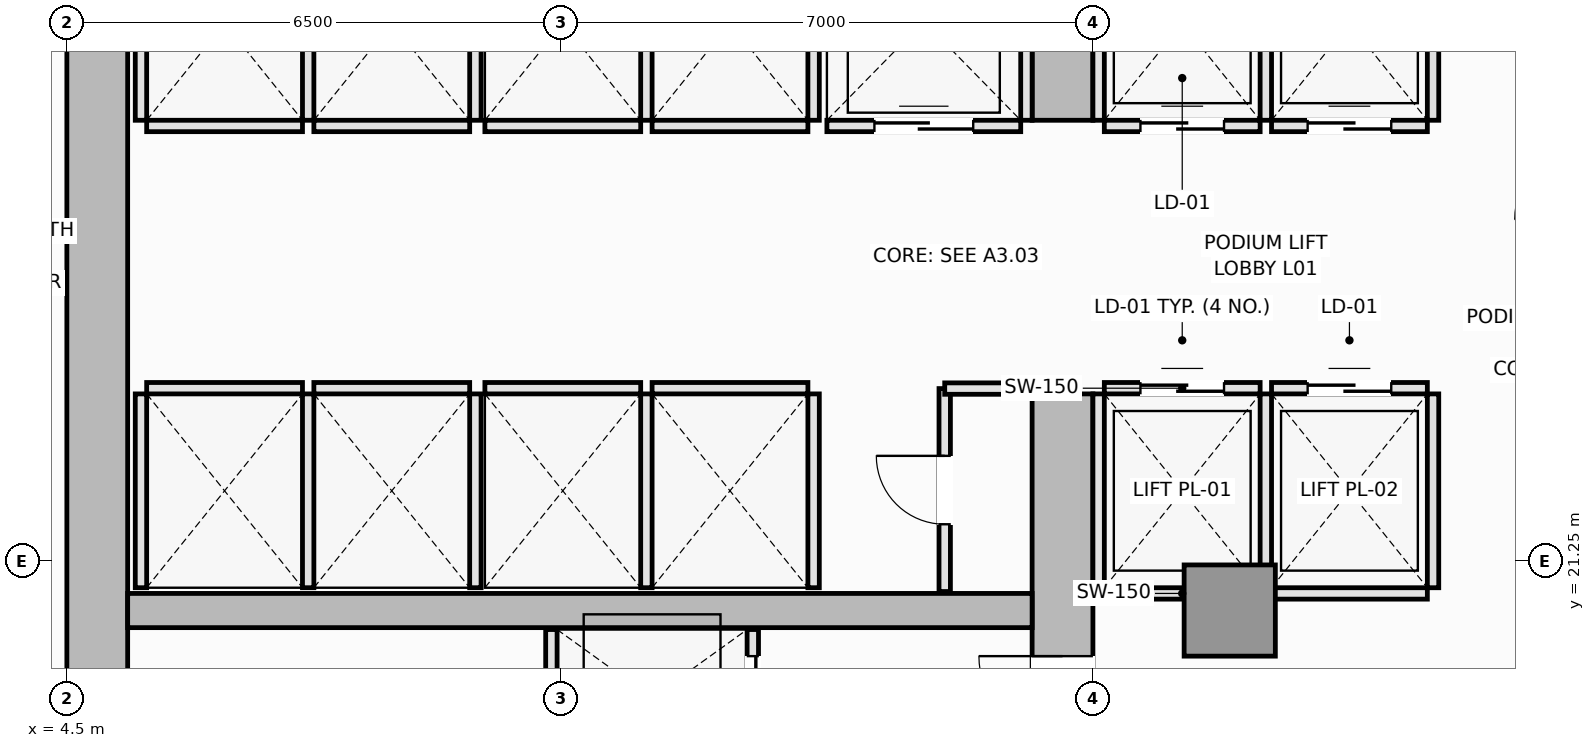
"""IFC4 building model, lengths in metres.
Left out: names, types, materials, properties, quantities, classifications, styles, units other than length and angle.
Written with IfcOpenShell. Run it as: python <this file> out.ifc"""

import sys

from ifc_helpers import new_model, si_unit, direction, frame, frame_2d, origin, origin_2d, place, context, subcontext, project, spatial, rectangle, extrude, element, fill, save


model = new_model("IFC4")
c1 = context("Model", 3, precision=1e-05, world=origin(), true_north=direction((0.0, 1.0)))
c2 = subcontext(c1, "Body", "Model", "MODEL_VIEW")
j1 = project(units=[si_unit("LENGTHUNIT", "METRE"), si_unit("PLANEANGLEUNIT", "RADIAN")], contexts=[c1])
p1 = place(None, origin())
s1 = spatial("IfcSite", under=j1, at=p1, CompositionType="ELEMENT")
p2 = place(p1, origin())
s2 = spatial("IfcBuilding", under=s1, at=p2, CompositionType="ELEMENT")
p3 = place(p2, frame((0.0, 0.0, 6.0)))
s3 = spatial("IfcBuildingStorey", under=s2, at=p3, CompositionType="ELEMENT", Elevation=6.0)
p4 = place(p3, frame((4.9, 14.8, 0.0), z_axis=(0.0, 0.0, 1.0), x_axis=(0.0, 1.0, 0.0)))
e1 = element("IfcWall", 1, at=p4, inside=s3, PredefinedType="SHEAR", context=c2, shape_type="SweptSolid", body=[
    extrude(rectangle(XDim=20.9, YDim=0.8, at=frame_2d((10.45, 0.0))), origin(), (0.0, 0.0, 1.0), 4.8),
])
p5 = place(p3, frame((17.6, 14.8, 0.0), z_axis=(0.0, 0.0, 1.0), x_axis=(0.0, 1.0, 0.0)))
e2 = element("IfcWall", 2, at=p5, inside=s3, PredefinedType="SHEAR", context=c2, shape_type="SweptSolid", body=[
    extrude(rectangle(XDim=8.65, YDim=0.8, at=frame_2d((4.325, 0.0))), origin(), (0.0, 0.0, 1.0), 4.8),
])
p6 = place(p5, frame((4.1, 0.0, 0.0)))
e3 = element("IfcOpeningElement", 3, at=p6, cuts=e2, PredefinedType="OPENING", context=c2, shape_type="SweptSolid", body=[
    extrude(rectangle(XDim=1.1, YDim=2.15, at=frame_2d((0.55, 1.075))), frame((0.0, 0.41, 0.0), z_axis=(0.0, -1.0, 0.0), x_axis=(1.0, 0.0, 0.0)), (0.0, 0.0, 1.0), 0.82),
])
p7 = place(p3, frame((17.6, 27.05, 0.0), z_axis=(0.0, 0.0, 1.0), x_axis=(0.0, 1.0, 0.0)))
e4 = element("IfcWall", 4, at=p7, inside=s3, PredefinedType="SHEAR", context=c2, shape_type="SweptSolid", body=[
    extrude(rectangle(XDim=8.65, YDim=0.8, at=frame_2d((4.325, 0.0))), origin(), (0.0, 0.0, 1.0), 4.8),
])
p8 = place(p7, frame((3.45, 0.0, 0.0)))
e5 = element("IfcOpeningElement", 5, at=p8, cuts=e4, PredefinedType="OPENING", context=c2, shape_type="SweptSolid", body=[
    extrude(rectangle(XDim=1.1, YDim=2.15, at=frame_2d((0.55, 1.075))), frame((0.0, 0.41, 0.0), z_axis=(0.0, -1.0, 0.0), x_axis=(1.0, 0.0, 0.0)), (0.0, 0.0, 1.0), 0.82),
])
p9 = place(p3, frame((5.3, 20.6, 0.0), z_axis=(0.0, 0.0, 1.0), x_axis=(1.0, 0.0, 0.0)))
e6 = element("IfcWall", 6, at=p9, inside=s3, PredefinedType="SHEAR", context=c2, shape_type="SweptSolid", body=[
    extrude(rectangle(XDim=11.9, YDim=0.45, at=frame_2d((5.95, 0.0))), origin(), (0.0, 0.0, 1.0), 4.8),
])
p10 = place(p3, frame((19.8, 20.6, 0.0), z_axis=(0.0, 0.0, 1.0), x_axis=(1.0, 0.0, 0.0)))
e7 = element("IfcColumn", 7, at=p10, inside=s3, PredefinedType="COLUMN", context=c2, shape_type="SweptSolid", body=[
    extrude(rectangle(XDim=1.2, YDim=1.2, at=origin_2d()), origin(), (0.0, 0.0, 1.0), 4.8),
])
p11 = place(p3, frame((18.15, 20.825, 0.0), z_axis=(0.0, 0.0, 1.0), x_axis=(1.0, 0.0, 0.0)))
e8 = element("IfcWall", 8, at=p11, inside=s3, PredefinedType="PARTITIONING", context=c2, shape_type="SweptSolid", body=[
    extrude(rectangle(XDim=2.05, YDim=0.15, at=frame_2d((1.025, 0.0))), origin(), (0.0, 0.0, 1.0), 4.6),
])
p12 = place(p3, frame((18.15, 23.525, 0.0), z_axis=(0.0, 0.0, 1.0), x_axis=(1.0, 0.0, 0.0)))
e9 = element("IfcWall", 9, at=p12, inside=s3, PredefinedType="PARTITIONING", context=c2, shape_type="SweptSolid", body=[
    extrude(rectangle(XDim=2.05, YDim=0.15, at=frame_2d((1.025, 0.0))), origin(), (0.0, 0.0, 1.0), 4.6),
])
p13 = place(p12, frame((0.475, 0.0, 0.0)))
e10 = element("IfcOpeningElement", 10, at=p13, cuts=e9, PredefinedType="OPENING", context=c2, shape_type="SweptSolid", body=[
    extrude(rectangle(XDim=1.1, YDim=2.2, at=frame_2d((0.55, 1.1))), frame((0.0, 0.085, 0.0), z_axis=(0.0, -1.0, 0.0), x_axis=(1.0, 0.0, 0.0)), (0.0, 0.0, 1.0), 0.17),
])
for number, where, z_axis, x_axis in (
    (11, (18.075, 20.9, 0.0), (0.0, 0.0, 1.0), (0.0, 1.0, 0.0)),
    (12, (20.275, 20.9, 0.0), (0.0, 0.0, 1.0), (0.0, 1.0, 0.0)),
):
    element("IfcWall", number, at=place(p3, frame(where, z_axis=z_axis, x_axis=x_axis)), inside=s3, PredefinedType="PARTITIONING", context=c2, shape_type="SweptSolid", body=[
        extrude(rectangle(XDim=2.55, YDim=0.15, at=frame_2d((1.275, 0.0))), origin(), (0.0, 0.0, 1.0), 4.6),
    ])
p14 = place(p3, frame((20.35, 20.825, 0.0), z_axis=(0.0, 0.0, 1.0), x_axis=(1.0, 0.0, 0.0)))
e13 = element("IfcWall", 13, at=p14, inside=s3, PredefinedType="PARTITIONING", context=c2, shape_type="SweptSolid", body=[
    extrude(rectangle(XDim=2.05, YDim=0.15, at=frame_2d((1.025, 0.0))), origin(), (0.0, 0.0, 1.0), 4.6),
])
p15 = place(p3, frame((20.35, 23.525, 0.0), z_axis=(0.0, 0.0, 1.0), x_axis=(1.0, 0.0, 0.0)))
e14 = element("IfcWall", 14, at=p15, inside=s3, PredefinedType="PARTITIONING", context=c2, shape_type="SweptSolid", body=[
    extrude(rectangle(XDim=2.05, YDim=0.15, at=frame_2d((1.025, 0.0))), origin(), (0.0, 0.0, 1.0), 4.6),
])
p16 = place(p15, frame((0.475, 0.0, 0.0)))
e15 = element("IfcOpeningElement", 15, at=p16, cuts=e14, PredefinedType="OPENING", context=c2, shape_type="SweptSolid", body=[
    extrude(rectangle(XDim=1.1, YDim=2.2, at=frame_2d((0.55, 1.1))), frame((0.0, 0.085, 0.0), z_axis=(0.0, -1.0, 0.0), x_axis=(1.0, 0.0, 0.0)), (0.0, 0.0, 1.0), 0.17),
])
p17 = place(p3, frame((22.475, 20.9, 0.0), z_axis=(0.0, 0.0, 1.0), x_axis=(0.0, 1.0, 0.0)))
e16 = element("IfcWall", 16, at=p17, inside=s3, PredefinedType="PARTITIONING", context=c2, shape_type="SweptSolid", body=[
    extrude(rectangle(XDim=2.55, YDim=0.15, at=frame_2d((1.275, 0.0))), origin(), (0.0, 0.0, 1.0), 4.6),
])
p18 = place(p3, frame((18.15, 26.975, 0.0), z_axis=(0.0, 0.0, 1.0), x_axis=(1.0, 0.0, 0.0)))
e17 = element("IfcWall", 17, at=p18, inside=s3, PredefinedType="PARTITIONING", context=c2, shape_type="SweptSolid", body=[
    extrude(rectangle(XDim=2.05, YDim=0.15, at=frame_2d((1.025, 0.0))), origin(), (0.0, 0.0, 1.0), 4.6),
])
p19 = place(p18, frame((0.475, 0.0, 0.0)))
e18 = element("IfcOpeningElement", 18, at=p19, cuts=e17, PredefinedType="OPENING", context=c2, shape_type="SweptSolid", body=[
    extrude(rectangle(XDim=1.1, YDim=2.2, at=frame_2d((0.55, 1.1))), frame((0.0, 0.085, 0.0), z_axis=(0.0, -1.0, 0.0), x_axis=(1.0, 0.0, 0.0)), (0.0, 0.0, 1.0), 0.17),
])
for number, where, z_axis, x_axis in (
    (19, (18.075, 27.05, 0.0), (0.0, 0.0, 1.0), (0.0, 1.0, 0.0)),
    (20, (20.275, 27.05, 0.0), (0.0, 0.0, 1.0), (0.0, 1.0, 0.0)),
):
    element("IfcWall", number, at=place(p3, frame(where, z_axis=z_axis, x_axis=x_axis)), inside=s3, PredefinedType="PARTITIONING", context=c2, shape_type="SweptSolid", body=[
        extrude(rectangle(XDim=2.55, YDim=0.15, at=frame_2d((1.275, 0.0))), origin(), (0.0, 0.0, 1.0), 4.6),
    ])
p20 = place(p3, frame((20.35, 26.975, 0.0), z_axis=(0.0, 0.0, 1.0), x_axis=(1.0, 0.0, 0.0)))
e21 = element("IfcWall", 21, at=p20, inside=s3, PredefinedType="PARTITIONING", context=c2, shape_type="SweptSolid", body=[
    extrude(rectangle(XDim=2.05, YDim=0.15, at=frame_2d((1.025, 0.0))), origin(), (0.0, 0.0, 1.0), 4.6),
])
p21 = place(p20, frame((0.475, 0.0, 0.0)))
e22 = element("IfcOpeningElement", 22, at=p21, cuts=e21, PredefinedType="OPENING", context=c2, shape_type="SweptSolid", body=[
    extrude(rectangle(XDim=1.1, YDim=2.2, at=frame_2d((0.55, 1.1))), frame((0.0, 0.085, 0.0), z_axis=(0.0, -1.0, 0.0), x_axis=(1.0, 0.0, 0.0)), (0.0, 0.0, 1.0), 0.17),
])
p22 = place(p3, frame((22.475, 27.05, 0.0), z_axis=(0.0, 0.0, 1.0), x_axis=(0.0, 1.0, 0.0)))
e23 = element("IfcWall", 23, at=p22, inside=s3, PredefinedType="PARTITIONING", context=c2, shape_type="SweptSolid", body=[
    extrude(rectangle(XDim=2.55, YDim=0.15, at=frame_2d((1.275, 0.0))), origin(), (0.0, 0.0, 1.0), 4.6),
])
p23 = place(p3, frame((5.55, 23.525, 0.0), z_axis=(0.0, 0.0, 1.0), x_axis=(1.0, 0.0, 0.0)))
e24 = element("IfcWall", 24, at=p23, inside=s3, PredefinedType="PARTITIONING", context=c2, shape_type="SweptSolid", body=[
    extrude(rectangle(XDim=2.05, YDim=0.15, at=frame_2d((1.025, 0.0))), origin(), (0.0, 0.0, 1.0), 4.6),
])
for number, where, z_axis, x_axis in (
    (25, (5.475, 20.9, 0.0), (0.0, 0.0, 1.0), (0.0, 1.0, 0.0)),
    (26, (7.675, 20.9, 0.0), (0.0, 0.0, 1.0), (0.0, 1.0, 0.0)),
):
    element("IfcWall", number, at=place(p3, frame(where, z_axis=z_axis, x_axis=x_axis)), inside=s3, PredefinedType="PARTITIONING", context=c2, shape_type="SweptSolid", body=[
        extrude(rectangle(XDim=2.55, YDim=0.15, at=frame_2d((1.275, 0.0))), origin(), (0.0, 0.0, 1.0), 4.6),
    ])
p24 = place(p3, frame((7.75, 23.525, 0.0), z_axis=(0.0, 0.0, 1.0), x_axis=(1.0, 0.0, 0.0)))
e27 = element("IfcWall", 27, at=p24, inside=s3, PredefinedType="PARTITIONING", context=c2, shape_type="SweptSolid", body=[
    extrude(rectangle(XDim=2.05, YDim=0.15, at=frame_2d((1.025, 0.0))), origin(), (0.0, 0.0, 1.0), 4.6),
])
p25 = place(p3, frame((9.875, 20.9, 0.0), z_axis=(0.0, 0.0, 1.0), x_axis=(0.0, 1.0, 0.0)))
e28 = element("IfcWall", 28, at=p25, inside=s3, PredefinedType="PARTITIONING", context=c2, shape_type="SweptSolid", body=[
    extrude(rectangle(XDim=2.55, YDim=0.15, at=frame_2d((1.275, 0.0))), origin(), (0.0, 0.0, 1.0), 4.6),
])
p26 = place(p3, frame((5.55, 26.975, 0.0), z_axis=(0.0, 0.0, 1.0), x_axis=(1.0, 0.0, 0.0)))
e29 = element("IfcWall", 29, at=p26, inside=s3, PredefinedType="PARTITIONING", context=c2, shape_type="SweptSolid", body=[
    extrude(rectangle(XDim=2.05, YDim=0.15, at=frame_2d((1.025, 0.0))), origin(), (0.0, 0.0, 1.0), 4.6),
])
for number, where, z_axis, x_axis in (
    (30, (5.475, 27.05, 0.0), (0.0, 0.0, 1.0), (0.0, 1.0, 0.0)),
    (31, (7.675, 27.05, 0.0), (0.0, 0.0, 1.0), (0.0, 1.0, 0.0)),
):
    element("IfcWall", number, at=place(p3, frame(where, z_axis=z_axis, x_axis=x_axis)), inside=s3, PredefinedType="PARTITIONING", context=c2, shape_type="SweptSolid", body=[
        extrude(rectangle(XDim=2.55, YDim=0.15, at=frame_2d((1.275, 0.0))), origin(), (0.0, 0.0, 1.0), 4.6),
    ])
p27 = place(p3, frame((7.75, 26.975, 0.0), z_axis=(0.0, 0.0, 1.0), x_axis=(1.0, 0.0, 0.0)))
e32 = element("IfcWall", 32, at=p27, inside=s3, PredefinedType="PARTITIONING", context=c2, shape_type="SweptSolid", body=[
    extrude(rectangle(XDim=2.05, YDim=0.15, at=frame_2d((1.025, 0.0))), origin(), (0.0, 0.0, 1.0), 4.6),
])
p28 = place(p3, frame((9.875, 27.05, 0.0), z_axis=(0.0, 0.0, 1.0), x_axis=(0.0, 1.0, 0.0)))
e33 = element("IfcWall", 33, at=p28, inside=s3, PredefinedType="PARTITIONING", context=c2, shape_type="SweptSolid", body=[
    extrude(rectangle(XDim=2.55, YDim=0.15, at=frame_2d((1.275, 0.0))), origin(), (0.0, 0.0, 1.0), 4.6),
])
p29 = place(p3, frame((10.0, 23.525, 0.0), z_axis=(0.0, 0.0, 1.0), x_axis=(1.0, 0.0, 0.0)))
e34 = element("IfcWall", 34, at=p29, inside=s3, PredefinedType="PARTITIONING", context=c2, shape_type="SweptSolid", body=[
    extrude(rectangle(XDim=2.05, YDim=0.15, at=frame_2d((1.025, 0.0))), origin(), (0.0, 0.0, 1.0), 4.6),
])
p30 = place(p3, frame((12.125, 20.9, 0.0), z_axis=(0.0, 0.0, 1.0), x_axis=(0.0, 1.0, 0.0)))
e35 = element("IfcWall", 35, at=p30, inside=s3, PredefinedType="PARTITIONING", context=c2, shape_type="SweptSolid", body=[
    extrude(rectangle(XDim=2.55, YDim=0.15, at=frame_2d((1.275, 0.0))), origin(), (0.0, 0.0, 1.0), 4.6),
])
p31 = place(p3, frame((12.2, 23.525, 0.0), z_axis=(0.0, 0.0, 1.0), x_axis=(1.0, 0.0, 0.0)))
e36 = element("IfcWall", 36, at=p31, inside=s3, PredefinedType="PARTITIONING", context=c2, shape_type="SweptSolid", body=[
    extrude(rectangle(XDim=2.05, YDim=0.15, at=frame_2d((1.025, 0.0))), origin(), (0.0, 0.0, 1.0), 4.6),
])
p32 = place(p3, frame((14.325, 20.9, 0.0), z_axis=(0.0, 0.0, 1.0), x_axis=(0.0, 1.0, 0.0)))
e37 = element("IfcWall", 37, at=p32, inside=s3, PredefinedType="PARTITIONING", context=c2, shape_type="SweptSolid", body=[
    extrude(rectangle(XDim=2.55, YDim=0.15, at=frame_2d((1.275, 0.0))), origin(), (0.0, 0.0, 1.0), 4.6),
])
p33 = place(p3, frame((10.0, 26.975, 0.0), z_axis=(0.0, 0.0, 1.0), x_axis=(1.0, 0.0, 0.0)))
e38 = element("IfcWall", 38, at=p33, inside=s3, PredefinedType="PARTITIONING", context=c2, shape_type="SweptSolid", body=[
    extrude(rectangle(XDim=2.05, YDim=0.15, at=frame_2d((1.025, 0.0))), origin(), (0.0, 0.0, 1.0), 4.6),
])
p34 = place(p3, frame((12.125, 27.05, 0.0), z_axis=(0.0, 0.0, 1.0), x_axis=(0.0, 1.0, 0.0)))
e39 = element("IfcWall", 39, at=p34, inside=s3, PredefinedType="PARTITIONING", context=c2, shape_type="SweptSolid", body=[
    extrude(rectangle(XDim=2.55, YDim=0.15, at=frame_2d((1.275, 0.0))), origin(), (0.0, 0.0, 1.0), 4.6),
])
p35 = place(p3, frame((12.2, 26.975, 0.0), z_axis=(0.0, 0.0, 1.0), x_axis=(1.0, 0.0, 0.0)))
e40 = element("IfcWall", 40, at=p35, inside=s3, PredefinedType="PARTITIONING", context=c2, shape_type="SweptSolid", body=[
    extrude(rectangle(XDim=2.05, YDim=0.15, at=frame_2d((1.025, 0.0))), origin(), (0.0, 0.0, 1.0), 4.6),
])
p36 = place(p3, frame((14.325, 27.05, 0.0), z_axis=(0.0, 0.0, 1.0), x_axis=(0.0, 1.0, 0.0)))
e41 = element("IfcWall", 41, at=p36, inside=s3, PredefinedType="PARTITIONING", context=c2, shape_type="SweptSolid", body=[
    extrude(rectangle(XDim=2.55, YDim=0.15, at=frame_2d((1.275, 0.0))), origin(), (0.0, 0.0, 1.0), 4.6),
])
p37 = place(p3, frame((14.5, 26.975, 0.0), z_axis=(0.0, 0.0, 1.0), x_axis=(1.0, 0.0, 0.0)))
e42 = element("IfcWall", 42, at=p37, inside=s3, PredefinedType="PARTITIONING", context=c2, shape_type="SweptSolid", body=[
    extrude(rectangle(XDim=2.55, YDim=0.15, at=frame_2d((1.275, 0.0))), origin(), (0.0, 0.0, 1.0), 4.6),
])
p38 = place(p37, frame((0.625, 0.0, 0.0)))
e43 = element("IfcOpeningElement", 43, at=p38, cuts=e42, PredefinedType="OPENING", context=c2, shape_type="SweptSolid", body=[
    extrude(rectangle(XDim=1.3, YDim=2.2, at=frame_2d((0.65, 1.1))), frame((0.0, 0.085, 0.0), z_axis=(0.0, -1.0, 0.0), x_axis=(1.0, 0.0, 0.0)), (0.0, 0.0, 1.0), 0.17),
])
p39 = place(p3, frame((17.125, 27.05, 0.0), z_axis=(0.0, 0.0, 1.0), x_axis=(0.0, 1.0, 0.0)))
e44 = element("IfcWall", 44, at=p39, inside=s3, PredefinedType="PARTITIONING", context=c2, shape_type="SweptSolid", body=[
    extrude(rectangle(XDim=2.6, YDim=0.15, at=frame_2d((1.3, 0.0))), origin(), (0.0, 0.0, 1.0), 4.6),
])
p40 = place(p3, frame((10.875, 18.55, 0.0), z_axis=(0.0, 0.0, 1.0), x_axis=(0.0, 1.0, 0.0)))
e45 = element("IfcWall", 45, at=p40, inside=s3, PredefinedType="PARTITIONING", context=c2, shape_type="SweptSolid", body=[
    extrude(rectangle(XDim=1.8, YDim=0.15, at=frame_2d((0.9, 0.0))), origin(), (0.0, 0.0, 1.0), 4.6),
])
p41 = place(p3, frame((13.525, 18.55, 0.0), z_axis=(0.0, 0.0, 1.0), x_axis=(0.0, 1.0, 0.0)))
e46 = element("IfcWall", 46, at=p41, inside=s3, PredefinedType="PARTITIONING", context=c2, shape_type="SweptSolid", body=[
    extrude(rectangle(XDim=1.8, YDim=0.15, at=frame_2d((0.9, 0.0))), origin(), (0.0, 0.0, 1.0), 4.6),
])
p42 = place(p41, frame((0.35, 0.0, 0.0)))
e47 = element("IfcOpeningElement", 47, at=p42, cuts=e46, PredefinedType="OPENING", context=c2, shape_type="SweptSolid", body=[
    extrude(rectangle(XDim=1.1, YDim=2.2, at=frame_2d((0.55, 1.1))), frame((0.0, 0.085, 0.0), z_axis=(0.0, -1.0, 0.0), x_axis=(1.0, 0.0, 0.0)), (0.0, 0.0, 1.0), 0.17),
])
p43 = place(p3, frame((16.05, 20.85, 0.0), z_axis=(0.0, 0.0, 1.0), x_axis=(0.0, 1.0, 0.0)))
e48 = element("IfcWall", 48, at=p43, inside=s3, PredefinedType="PARTITIONING", context=c2, shape_type="SweptSolid", body=[
    extrude(rectangle(XDim=2.67, YDim=0.15, at=frame_2d((1.335, 0.0))), origin(), (0.0, 0.0, 1.0), 4.6),
])
p44 = place(p43, frame((0.885, 0.0, 0.0)))
e49 = element("IfcOpeningElement", 49, at=p44, cuts=e48, PredefinedType="OPENING", context=c2, shape_type="SweptSolid", body=[
    extrude(rectangle(XDim=0.9, YDim=2.1, at=frame_2d((0.45, 1.05))), frame((0.0, 0.085, 0.0), z_axis=(0.0, -1.0, 0.0), x_axis=(1.0, 0.0, 0.0)), (0.0, 0.0, 1.0), 0.17),
])
p45 = place(p3, frame((16.05, 23.52, 0.0), z_axis=(0.0, 0.0, 1.0), x_axis=(1.0, 0.0, 0.0)))
e50 = element("IfcWall", 50, at=p45, inside=s3, PredefinedType="PARTITIONING", context=c2, shape_type="SweptSolid", body=[
    extrude(rectangle(XDim=1.17, YDim=0.15, at=frame_2d((0.585, 0.0))), origin(), (0.0, 0.0, 1.0), 4.6),
])
p46 = place(p13, origin())
e51 = element("IfcDoor", 51, at=p46, inside=s3, OperationType="DOUBLE_DOOR_SLIDING", PredefinedType="DOOR", context=c2, shape_type="SweptSolid", body=[
    extrude(rectangle(XDim=1.1, YDim=2.2, at=frame_2d((0.55, 1.1))), frame((0.0, 0.025, 0.0), z_axis=(0.0, -1.0, 0.0), x_axis=(1.0, 0.0, 0.0)), (0.0, 0.0, 1.0), 0.05),
])
fill(e10, e51)
p47 = place(p16, origin())
e52 = element("IfcDoor", 52, at=p47, inside=s3, OperationType="DOUBLE_DOOR_SLIDING", PredefinedType="DOOR", context=c2, shape_type="SweptSolid", body=[
    extrude(rectangle(XDim=1.1, YDim=2.2, at=frame_2d((0.55, 1.1))), frame((0.0, 0.025, 0.0), z_axis=(0.0, -1.0, 0.0), x_axis=(1.0, 0.0, 0.0)), (0.0, 0.0, 1.0), 0.05),
])
fill(e15, e52)
p48 = place(p19, origin())
e53 = element("IfcDoor", 53, at=p48, inside=s3, OperationType="DOUBLE_DOOR_SLIDING", PredefinedType="DOOR", context=c2, shape_type="SweptSolid", body=[
    extrude(rectangle(XDim=1.1, YDim=2.2, at=frame_2d((0.55, 1.1))), frame((0.0, 0.025, 0.0), z_axis=(0.0, -1.0, 0.0), x_axis=(1.0, 0.0, 0.0)), (0.0, 0.0, 1.0), 0.05),
])
fill(e18, e53)
p49 = place(p21, origin())
e54 = element("IfcDoor", 54, at=p49, inside=s3, OperationType="DOUBLE_DOOR_SLIDING", PredefinedType="DOOR", context=c2, shape_type="SweptSolid", body=[
    extrude(rectangle(XDim=1.1, YDim=2.2, at=frame_2d((0.55, 1.1))), frame((0.0, 0.025, 0.0), z_axis=(0.0, -1.0, 0.0), x_axis=(1.0, 0.0, 0.0)), (0.0, 0.0, 1.0), 0.05),
])
fill(e22, e54)
p50 = place(p38, origin())
e55 = element("IfcDoor", 55, at=p50, inside=s3, OperationType="DOUBLE_DOOR_SLIDING", PredefinedType="DOOR", context=c2, shape_type="SweptSolid", body=[
    extrude(rectangle(XDim=1.3, YDim=2.2, at=frame_2d((0.65, 1.1))), frame((0.0, 0.025, 0.0), z_axis=(0.0, -1.0, 0.0), x_axis=(1.0, 0.0, 0.0)), (0.0, 0.0, 1.0), 0.05),
])
fill(e43, e55)
p51 = place(p42, origin())
e56 = element("IfcDoor", 56, at=p51, inside=s3, OperationType="DOUBLE_DOOR_SLIDING", PredefinedType="DOOR", context=c2, shape_type="SweptSolid", body=[
    extrude(rectangle(XDim=1.1, YDim=2.2, at=frame_2d((0.55, 1.1))), frame((0.0, 0.025, 0.0), z_axis=(0.0, -1.0, 0.0), x_axis=(1.0, 0.0, 0.0)), (0.0, 0.0, 1.0), 0.05),
])
fill(e47, e56)
p52 = place(p6, origin())
e57 = element("IfcDoor", 57, at=p52, inside=s3, OperationType="SINGLE_SWING_RIGHT", PredefinedType="DOOR", context=c2, shape_type="SweptSolid", body=[
    extrude(rectangle(XDim=1.1, YDim=2.15, at=frame_2d((0.55, 1.075))), frame((0.0, 0.025, 0.0), z_axis=(0.0, -1.0, 0.0), x_axis=(1.0, 0.0, 0.0)), (0.0, 0.0, 1.0), 0.05),
])
fill(e3, e57)
p53 = place(p44, origin())
e58 = element("IfcDoor", 58, at=p53, inside=s3, OperationType="SINGLE_SWING_RIGHT", PredefinedType="DOOR", context=c2, shape_type="SweptSolid", body=[
    extrude(rectangle(XDim=0.9, YDim=2.1, at=frame_2d((0.45, 1.05))), frame((0.0, 0.025, 0.0), z_axis=(0.0, -1.0, 0.0), x_axis=(1.0, 0.0, 0.0)), (0.0, 0.0, 1.0), 0.05),
])
fill(e49, e58)
save(model, sys.argv[1])
